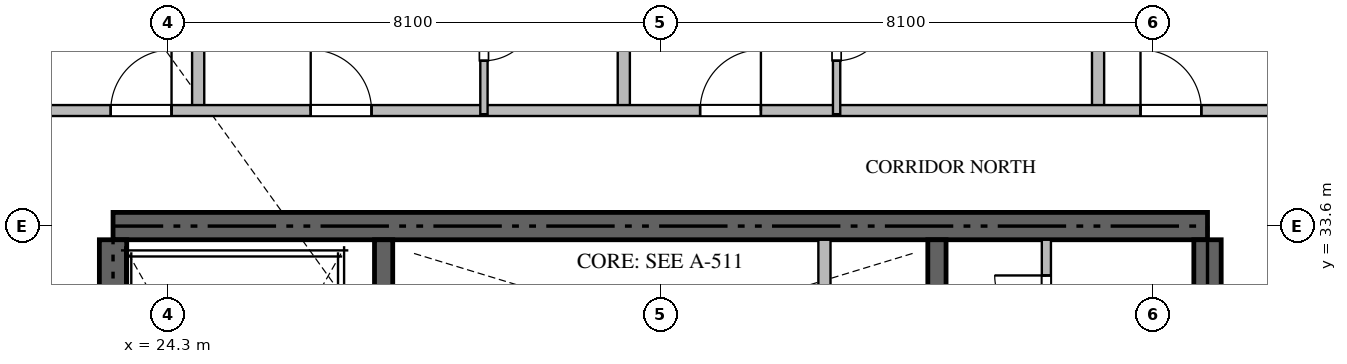
"""IFC4 building model, lengths in metres.
Left out: names, types, materials, properties, quantities, classifications, styles, units other than length and angle.
Written with IfcOpenShell. Run it as: python <this file> out.ifc"""

import sys

from ifc_helpers import new_model, si_unit, direction, frame, frame_2d, origin, place, context, subcontext, project, spatial, rectangle, extrude, source, transform, mapped, element, fill, save


model = new_model("IFC4")
c1 = context("Model", 3, precision=1e-05, world=origin(), true_north=direction((0.0, 1.0)))
c2 = subcontext(c1, "Body", "Model", "MODEL_VIEW")
j1 = project(units=[si_unit("LENGTHUNIT", "METRE"), si_unit("PLANEANGLEUNIT", "RADIAN")], contexts=[c1])
p1 = place(None, origin())
s1 = spatial("IfcSite", under=j1, at=p1, CompositionType="ELEMENT")
p2 = place(p1, origin())
s2 = spatial("IfcBuilding", under=s1, at=p2, CompositionType="ELEMENT")
p3 = place(p2, frame((0.0, 0.0, 90.45)))
s3 = spatial("IfcBuildingStorey", under=s2, at=p3, CompositionType="ELEMENT", Elevation=90.45)
p4 = place(p3, frame((41.4, 33.6, -0.26), z_axis=(0.0, 0.0, 1.0), x_axis=(-1.0, 0.0, 0.0)))
e1 = element("IfcWall", 1, at=p4, inside=s3, PredefinedType="SHEAR", context=c2, shape_type="SweptSolid", body=[
    extrude(rectangle(XDim=18.0, YDim=0.45, at=frame_2d((9.0, 0.0))), origin(), (0.0, 0.0, 1.0), 3.748),
])
p5 = place(p3, frame((23.4, 24.25, -0.26), z_axis=(0.0, 0.0, 1.0), x_axis=(0.0, 1.0, 0.0)))
e2 = element("IfcWall", 2, at=p5, inside=s3, PredefinedType="SHEAR", context=c2, shape_type="SweptSolid", body=[
    extrude(rectangle(XDim=9.125, YDim=0.45, at=frame_2d((4.562, 0.0))), origin(), (0.0, 0.0, 1.0), 3.748),
])
p6 = place(p3, frame((41.4, 27.75, -0.26), z_axis=(0.0, 0.0, 1.0), x_axis=(0.0, 1.0, 0.0)))
e3 = element("IfcWall", 3, at=p6, inside=s3, PredefinedType="SHEAR", context=c2, shape_type="SweptSolid", body=[
    extrude(rectangle(XDim=5.625, YDim=0.45, at=frame_2d((2.812, 0.0))), origin(), (0.0, 0.0, 1.0), 3.748),
])
p7 = place(p3, frame((27.85, 23.55, -0.26), z_axis=(0.0, 0.0, 1.0), x_axis=(0.0, 1.0, 0.0)))
e4 = element("IfcWall", 4, at=p7, inside=s3, PredefinedType="SHEAR", context=c2, shape_type="SweptSolid", body=[
    extrude(rectangle(XDim=9.825, YDim=0.3, at=frame_2d((4.913, 0.0))), origin(), (0.0, 0.0, 1.0), 3.748),
])
p8 = place(p3, frame((36.95, 27.05, -0.26), z_axis=(0.0, 0.0, 1.0), x_axis=(0.0, 1.0, 0.0)))
e5 = element("IfcWall", 5, at=p8, inside=s3, PredefinedType="SHEAR", context=c2, shape_type="SweptSolid", body=[
    extrude(rectangle(XDim=6.325, YDim=0.3, at=frame_2d((3.163, 0.0))), origin(), (0.0, 0.0, 1.0), 3.748),
])
p9 = place(p3, frame((35.1, 30.75, 0.0), z_axis=(0.0, 0.0, 1.0), x_axis=(0.0, 1.0, 0.0)))
e6 = element("IfcWall", 6, at=p9, inside=s3, PredefinedType="STANDARD", context=c2, shape_type="SweptSolid", body=[
    extrude(rectangle(XDim=2.625, YDim=0.2, at=frame_2d((1.312, 0.0))), origin(), (0.0, 0.0, 1.0), 3.49),
])
p10 = place(p3, frame((38.75, 31.352, 0.0), z_axis=(0.0, 0.0, 1.0), x_axis=(0.0, 1.0, 0.0)))
e7 = element("IfcWall", 7, at=p10, inside=s3, PredefinedType="PARTITIONING", context=c2, shape_type="SweptSolid", body=[
    extrude(rectangle(XDim=2.023, YDim=0.15, at=frame_2d((1.011, 0.0))), origin(), (0.0, 0.0, 1.0), 3.49),
])
p11 = place(p10, frame((0.586, 0.0, 0.0)))
e8 = element("IfcOpeningElement", 8, at=p11, cuts=e7, PredefinedType="OPENING", context=c2, shape_type="SweptSolid", body=[
    extrude(rectangle(XDim=0.85, YDim=2.1, at=frame_2d((0.425, 1.05))), frame((0.0, 0.085, 0.0), z_axis=(0.0, -1.0, 0.0), x_axis=(1.0, 0.0, 0.0)), (0.0, 0.0, 1.0), 0.17),
])
for number, where, z_axis, x_axis in (
    (9, (24.8, 35.5, 0.0), (0.0, 0.0, 1.0), (0.0, 1.0, 0.0)),
    (10, (31.8, 35.5, 0.0), (0.0, 0.0, 1.0), (0.0, 1.0, 0.0)),
    (11, (39.6, 35.5, 0.0), (0.0, 0.0, 1.0), (0.0, 1.0, 0.0)),
):
    element("IfcWall", number, at=place(p3, frame(where, z_axis=z_axis, x_axis=x_axis)), inside=s3, PredefinedType="PARTITIONING", context=c2, shape_type="SweptSolid", body=[
        extrude(rectangle(XDim=14.618, YDim=0.2, at=frame_2d((7.309, 0.0))), origin(), (0.0, 0.0, 1.0), 3.49),
    ])
p12 = place(p3, frame((21.402, 35.5, 0.0), z_axis=(0.0, 0.0, 1.0), x_axis=(1.0, 0.0, 0.0)))
e12 = element("IfcWall", 12, at=p12, inside=s3, PredefinedType="PARTITIONING", context=c2, shape_type="SweptSolid", body=[
    extrude(rectangle(XDim=21.996, YDim=0.18, at=frame_2d((10.998, 0.0))), origin(), (0.0, 0.0, 1.0), 3.49),
])
p13 = place(p12, frame((1.96, 0.0, 0.0)))
e13 = element("IfcOpeningElement", 13, at=p13, cuts=e12, PredefinedType="OPENING", context=c2, shape_type="SweptSolid", body=[
    extrude(rectangle(XDim=1.0, YDim=2.15, at=frame_2d((0.5, 1.075))), frame((0.0, 0.1, 0.0), z_axis=(0.0, -1.0, 0.0), x_axis=(1.0, 0.0, 0.0)), (0.0, 0.0, 1.0), 0.2),
])
p14 = place(p12, frame((5.249, 0.0, 0.0)))
e14 = element("IfcOpeningElement", 14, at=p14, cuts=e12, PredefinedType="OPENING", context=c2, shape_type="SweptSolid", body=[
    extrude(rectangle(XDim=1.0, YDim=2.15, at=frame_2d((0.5, 1.075))), frame((0.0, 0.1, 0.0), z_axis=(0.0, -1.0, 0.0), x_axis=(1.0, 0.0, 0.0)), (0.0, 0.0, 1.0), 0.2),
])
p15 = place(p12, frame((11.653, 0.0, 0.0)))
e15 = element("IfcOpeningElement", 15, at=p15, cuts=e12, PredefinedType="OPENING", context=c2, shape_type="SweptSolid", body=[
    extrude(rectangle(XDim=1.0, YDim=2.15, at=frame_2d((0.5, 1.075))), frame((0.0, 0.1, 0.0), z_axis=(0.0, -1.0, 0.0), x_axis=(1.0, 0.0, 0.0)), (0.0, 0.0, 1.0), 0.2),
])
p16 = place(p12, frame((18.896, 0.0, 0.0)))
e16 = element("IfcOpeningElement", 16, at=p16, cuts=e12, PredefinedType="OPENING", context=c2, shape_type="SweptSolid", body=[
    extrude(rectangle(XDim=1.0, YDim=2.15, at=frame_2d((0.5, 1.075))), frame((0.0, 0.1, 0.0), z_axis=(0.0, -1.0, 0.0), x_axis=(1.0, 0.0, 0.0)), (0.0, 0.0, 1.0), 0.2),
])
p17 = place(p3, frame((29.5, 38.048, 0.0), z_axis=(0.0, 0.0, 1.0), x_axis=(0.0, -1.0, 0.0)))
e17 = element("IfcWall", 17, at=p17, inside=s3, PredefinedType="PARTITIONING", context=c2, shape_type="SweptSolid", body=[
    extrude(rectangle(XDim=2.608, YDim=0.12, at=frame_2d((1.304, 0.0))), origin(), (0.0, 0.0, 1.0), 3.49),
])
p18 = place(p17, frame((0.879, 0.0, 0.0)))
e18 = element("IfcOpeningElement", 18, at=p18, cuts=e17, PredefinedType="OPENING", context=c2, shape_type="SweptSolid", body=[
    extrude(rectangle(XDim=0.85, YDim=2.1, at=frame_2d((0.425, 1.05))), frame((0.0, 0.07, 0.0), z_axis=(0.0, -1.0, 0.0), x_axis=(1.0, 0.0, 0.0)), (0.0, 0.0, 1.0), 0.14),
])
p19 = place(p3, frame((35.3, 38.048, 0.0), z_axis=(0.0, 0.0, 1.0), x_axis=(0.0, -1.0, 0.0)))
e19 = element("IfcWall", 19, at=p19, inside=s3, PredefinedType="PARTITIONING", context=c2, shape_type="SweptSolid", body=[
    extrude(rectangle(XDim=2.608, YDim=0.12, at=frame_2d((1.304, 0.0))), origin(), (0.0, 0.0, 1.0), 3.49),
])
p20 = place(p19, frame((0.879, 0.0, 0.0)))
e20 = element("IfcOpeningElement", 20, at=p20, cuts=e19, PredefinedType="OPENING", context=c2, shape_type="SweptSolid", body=[
    extrude(rectangle(XDim=0.85, YDim=2.1, at=frame_2d((0.425, 1.05))), frame((0.0, 0.07, 0.0), z_axis=(0.0, -1.0, 0.0), x_axis=(1.0, 0.0, 0.0)), (0.0, 0.0, 1.0), 0.14),
])
m1 = source(origin(), c2, "Body", "SweptSolid", [
    extrude(rectangle(XDim=0.85, YDim=2.1, at=frame_2d((0.425, 1.05))), frame((0.0, 0.025, 0.0), z_axis=(0.0, -1.0, 0.0), x_axis=(1.0, 0.0, 0.0)), (0.0, 0.0, 1.0), 0.05),
])
p21 = place(p11, origin())
e21 = element("IfcDoor", 21, at=p21, inside=s3, OperationType="SINGLE_SWING_RIGHT", PredefinedType="DOOR", context=c2, shape_type="MappedRepresentation", body=[
    mapped(m1, transform((0.0, 0.0, 0.0), scale=1.0)),
])
fill(e8, e21)
m2 = source(origin(), c2, "Body", "SweptSolid", [
    extrude(rectangle(XDim=1.0, YDim=2.15, at=frame_2d((0.5, 1.075))), frame((0.0, 0.025, 0.0), z_axis=(0.0, -1.0, 0.0), x_axis=(1.0, 0.0, 0.0)), (0.0, 0.0, 1.0), 0.05),
])
p22 = place(p13, origin())
e22 = element("IfcDoor", 22, at=p22, inside=s3, OperationType="SINGLE_SWING_RIGHT", PredefinedType="DOOR", context=c2, shape_type="MappedRepresentation", body=[
    mapped(m2, transform((0.0, 0.0, 0.0), scale=1.0)),
])
fill(e13, e22)
p23 = place(p14, origin())
e23 = element("IfcDoor", 23, at=p23, inside=s3, OperationType="SINGLE_SWING_LEFT", PredefinedType="DOOR", context=c2, shape_type="MappedRepresentation", body=[
    mapped(m2, transform((0.0, 0.0, 0.0), scale=1.0)),
])
fill(e14, e23)
p24 = place(p15, origin())
e24 = element("IfcDoor", 24, at=p24, inside=s3, OperationType="SINGLE_SWING_RIGHT", PredefinedType="DOOR", context=c2, shape_type="MappedRepresentation", body=[
    mapped(m2, transform((0.0, 0.0, 0.0), scale=1.0)),
])
fill(e15, e24)
p25 = place(p16, origin())
e25 = element("IfcDoor", 25, at=p25, inside=s3, OperationType="SINGLE_SWING_LEFT", PredefinedType="DOOR", context=c2, shape_type="MappedRepresentation", body=[
    mapped(m2, transform((0.0, 0.0, 0.0), scale=1.0)),
])
fill(e16, e25)
p26 = place(p18, origin())
e26 = element("IfcDoor", 26, at=p26, inside=s3, OperationType="SINGLE_SWING_LEFT", PredefinedType="DOOR", context=c2, shape_type="MappedRepresentation", body=[
    mapped(m1, transform((0.0, 0.0, 0.0), scale=1.0)),
])
fill(e18, e26)
p27 = place(p20, origin())
e27 = element("IfcDoor", 27, at=p27, inside=s3, OperationType="SINGLE_SWING_LEFT", PredefinedType="DOOR", context=c2, shape_type="MappedRepresentation", body=[
    mapped(m1, transform((0.0, 0.0, 0.0), scale=1.0)),
])
fill(e20, e27)
save(model, sys.argv[1])
